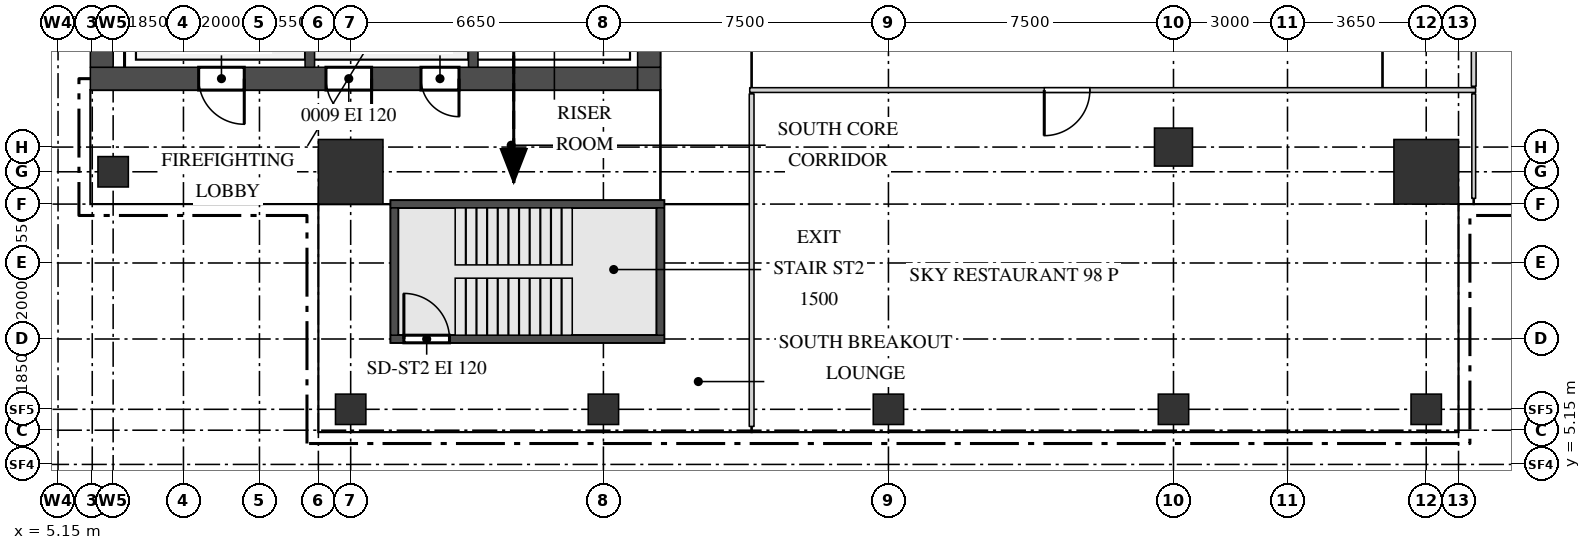
"""IFC4 building model, lengths in metres.
Left out: names, types, materials, properties, quantities, classifications, styles, units other than length and angle.
Written with IfcOpenShell. Run it as: python <this file> out.ifc"""

import sys

from ifc_helpers import new_model, si_unit, direction, frame, frame_2d, origin, origin_2d, place, context, subcontext, project, spatial, rectangle, extrude, source, transform, mapped, element, fill, save


model = new_model("IFC4")
c1 = context("Model", 3, precision=1e-05, world=origin(), true_north=direction((0.0, 1.0)))
c2 = subcontext(c1, "Body", "Model", "MODEL_VIEW")
j1 = project(units=[si_unit("LENGTHUNIT", "METRE"), si_unit("PLANEANGLEUNIT", "RADIAN")], contexts=[c1])
p1 = place(None, origin())
s1 = spatial("IfcSite", under=j1, at=p1, CompositionType="ELEMENT")
p2 = place(p1, origin())
s2 = spatial("IfcBuilding", under=s1, at=p2, CompositionType="ELEMENT")
p3 = place(p2, frame((0.0, 0.0, 306.2)))
s3 = spatial("IfcBuildingStorey", under=s2, at=p3, CompositionType="ELEMENT", Elevation=306.2)
m1 = source(origin(), c2, "Body", "SweptSolid", [
    extrude(rectangle(XDim=14.4, YDim=0.6, at=frame_2d((7.2, 0.0))), origin(), (0.0, 0.0, 1.0), 3.75),
])
p4 = place(p3, frame((6.0, 15.3, 0.0), z_axis=(0.0, 0.0, 1.0), x_axis=(1.0, 0.0, 0.0)))
e1 = element("IfcWall", 1, at=p4, inside=s3, PredefinedType="SHEAR", context=c2, shape_type="MappedRepresentation", body=[
    mapped(m1, transform((0.0, 0.0, 0.0))),
])
m2 = source(origin(), c2, "Body", "SweptSolid", [
    extrude(rectangle(XDim=1.2, YDim=2.1, at=frame_2d((0.6, 1.05))), frame((0.0, 0.31, 0.0), z_axis=(0.0, -1.0, 0.0), x_axis=(1.0, 0.0, 0.0)), (0.0, 0.0, 1.0), 0.62),
])
p5 = place(p4, frame((6.2, 0.0, 0.0)))
e2 = element("IfcOpeningElement", 2, at=p5, cuts=e1, PredefinedType="OPENING", context=c2, shape_type="MappedRepresentation", body=[
    mapped(m2, transform((0.0, 0.0, 0.0))),
])
p6 = place(p4, frame((2.85, 0.0, 0.0)))
e3 = element("IfcOpeningElement", 3, at=p6, cuts=e1, PredefinedType="OPENING", context=c2, shape_type="MappedRepresentation", body=[
    mapped(m2, transform((0.0, 0.0, 0.0))),
])
m3 = source(origin(), c2, "Body", "SweptSolid", [
    extrude(rectangle(XDim=1.0, YDim=2.1, at=frame_2d((0.5, 1.05))), frame((0.0, 0.31, 0.0), z_axis=(0.0, -1.0, 0.0), x_axis=(1.0, 0.0, 0.0)), (0.0, 0.0, 1.0), 0.62),
])
p7 = place(p4, frame((8.7, 0.0, 0.0)))
e4 = element("IfcOpeningElement", 4, at=p7, cuts=e1, PredefinedType="OPENING", context=c2, shape_type="MappedRepresentation", body=[
    mapped(m3, transform((0.0, 0.0, 0.0))),
])
m4 = source(origin(), c2, "Body", "SweptSolid", [
    extrude(rectangle(XDim=0.6, YDim=0.6, at=frame_2d((0.3, 0.0))), origin(), (0.0, 0.0, 1.0), 3.75),
])
p8 = place(p3, frame((20.4, 15.3, 0.0), z_axis=(0.0, 0.0, 1.0), x_axis=(1.0, 0.0, 0.0)))
e5 = element("IfcWall", 5, at=p8, inside=s3, PredefinedType="SHEAR", context=c2, shape_type="MappedRepresentation", body=[
    mapped(m4, transform((0.0, 0.0, 0.0))),
])
m5 = source(origin(), c2, "Body", "SweptSolid", [
    extrude(rectangle(XDim=22.8, YDim=0.6, at=frame_2d((11.4, 0.0))), origin(), (0.0, 0.0, 1.0), 3.75),
])
p9 = place(p3, frame((20.7, 15.6, 0.0), z_axis=(0.0, 0.0, 1.0), x_axis=(0.0, 1.0, 0.0)))
e6 = element("IfcWall", 6, at=p9, inside=s3, PredefinedType="SHEAR", context=c2, shape_type="MappedRepresentation", body=[
    mapped(m5, transform((0.0, 0.0, 0.0))),
])
m6 = source(origin(), c2, "Body", "SweptSolid", [
    extrude(rectangle(XDim=1.8, YDim=2.1, at=frame_2d((0.9, 1.05))), frame((0.0, 0.31, 0.0), z_axis=(0.0, -1.0, 0.0), x_axis=(1.0, 0.0, 0.0)), (0.0, 0.0, 1.0), 0.62),
])
p10 = place(p9, frame((10.9, 0.0, 0.0)))
e7 = element("IfcOpeningElement", 7, at=p10, cuts=e6, PredefinedType="OPENING", context=c2, shape_type="MappedRepresentation", body=[
    mapped(m6, transform((0.0, 0.0, 0.0))),
])
m7 = source(origin(), c2, "Body", "SweptSolid", [
    extrude(rectangle(XDim=0.9, YDim=2.1, at=frame_2d((0.45, 1.05))), frame((0.0, 0.31, 0.0), z_axis=(0.0, -1.0, 0.0), x_axis=(1.0, 0.0, 0.0)), (0.0, 0.0, 1.0), 0.62),
])
p11 = place(p9, frame((0.55, 0.0, 0.0)))
e8 = element("IfcOpeningElement", 8, at=p11, cuts=e6, PredefinedType="OPENING", context=c2, shape_type="MappedRepresentation", body=[
    mapped(m7, transform((0.0, 0.0, 0.0))),
])
p12 = place(p9, frame((3.0, 0.0, 0.0)))
e9 = element("IfcOpeningElement", 9, at=p12, cuts=e6, PredefinedType="OPENING", context=c2, shape_type="MappedRepresentation", body=[
    mapped(m7, transform((0.0, 0.0, 0.0))),
])
p13 = place(p9, frame((5.75, 0.0, 0.0)))
e10 = element("IfcOpeningElement", 10, at=p13, cuts=e6, PredefinedType="OPENING", context=c2, shape_type="MappedRepresentation", body=[
    mapped(m7, transform((0.0, 0.0, 0.0))),
])
p14 = place(p3, frame((6.3, 15.6, 0.0), z_axis=(0.0, 0.0, 1.0), x_axis=(0.0, 1.0, 0.0)))
e11 = element("IfcWall", 11, at=p14, inside=s3, PredefinedType="SHEAR", context=c2, shape_type="MappedRepresentation", body=[
    mapped(m5, transform((0.0, 0.0, 0.0))),
])
m8 = source(origin(), c2, "Body", "SweptSolid", [
    extrude(rectangle(XDim=7.2, YDim=0.2, at=frame_2d((3.6, 0.0))), origin(), (0.0, 0.0, 1.0), 3.75),
])
p15 = place(p3, frame((13.9, 12.0, 0.0), z_axis=(0.0, 0.0, 1.0), x_axis=(1.0, 0.0, 0.0)))
e12 = element("IfcWall", 12, at=p15, inside=s3, PredefinedType="SHEAR", context=c2, shape_type="MappedRepresentation", body=[
    mapped(m8, transform((0.0, 0.0, 0.0))),
])
p16 = place(p3, frame((13.9, 8.45, 0.0), z_axis=(0.0, 0.0, 1.0), x_axis=(1.0, 0.0, 0.0)))
e13 = element("IfcWall", 13, at=p16, inside=s3, PredefinedType="SHEAR", context=c2, shape_type="MappedRepresentation", body=[
    mapped(m8, transform((0.0, 0.0, 0.0))),
])
m9 = source(origin(), c2, "Body", "SweptSolid", [
    extrude(rectangle(XDim=1.2, YDim=2.1, at=frame_2d((0.6, 1.05))), frame((0.0, 0.11, 0.0), z_axis=(0.0, -1.0, 0.0), x_axis=(1.0, 0.0, 0.0)), (0.0, 0.0, 1.0), 0.22),
])
p17 = place(p16, frame((0.35, 0.0, 0.0)))
e14 = element("IfcOpeningElement", 14, at=p17, cuts=e13, PredefinedType="OPENING", context=c2, shape_type="MappedRepresentation", body=[
    mapped(m9, transform((0.0, 0.0, 0.0))),
])
m10 = source(origin(), c2, "Body", "SweptSolid", [
    extrude(rectangle(XDim=3.35, YDim=0.2, at=frame_2d((1.675, 0.0))), origin(), (0.0, 0.0, 1.0), 3.75),
])
for number, where, z_axis, x_axis in (
    (15, (21.0, 8.55, 0.0), (0.0, 0.0, 1.0), (0.0, 1.0, 0.0)),
    (16, (14.0, 8.55, 0.0), (0.0, 0.0, 1.0), (0.0, 1.0, 0.0)),
):
    element("IfcWall", number, at=place(p3, frame(where, z_axis=z_axis, x_axis=x_axis)), inside=s3, PredefinedType="SHEAR", context=c2, shape_type="MappedRepresentation", body=[
        mapped(m10, transform((0.0, 0.0, 0.0))),
    ])
m11 = source(origin(), c2, "Body", "SweptSolid", [
    extrude(rectangle(XDim=3.6, YDim=0.25, at=frame_2d((1.8, 0.0))), origin(), (0.0, 0.0, 1.0), 3.75),
])
for number, where, z_axis, x_axis in (
    (17, (16.075, 15.6, 0.0), (0.0, 0.0, 1.0), (0.0, 1.0, 0.0)),
    (18, (11.775, 15.6, 0.0), (0.0, 0.0, 1.0), (0.0, 1.0, 0.0)),
):
    element("IfcWall", number, at=place(p3, frame(where, z_axis=z_axis, x_axis=x_axis)), inside=s3, PredefinedType="STANDARD", context=c2, shape_type="MappedRepresentation", body=[
        mapped(m11, transform((0.0, 0.0, 0.0))),
    ])
m12 = source(origin(), c2, "Body", "SweptSolid", [
    extrude(rectangle(XDim=1.7, YDim=1.7, at=origin_2d()), origin(), (0.0, 0.0, 1.0), 3.75),
])
for number, where, z_axis, x_axis in (
    (19, (41.15, 12.85, 0.0), (0.0, 0.0, 1.0), (1.0, 0.0, 0.0)),
    (20, (12.85, 12.85, 0.0), (0.0, 0.0, 1.0), (1.0, 0.0, 0.0)),
):
    element("IfcColumn", number, at=place(p3, frame(where, z_axis=z_axis, x_axis=x_axis)), inside=s3, PredefinedType="COLUMN", context=c2, shape_type="MappedRepresentation", body=[
        mapped(m12, transform((0.0, 0.0, 0.0))),
    ])
m13 = source(origin(), c2, "Body", "SweptSolid", [
    extrude(rectangle(XDim=0.8, YDim=0.8, at=origin_2d()), origin(), (0.0, 0.0, 1.0), 3.75),
])
for number, where, z_axis, x_axis in (
    (21, (12.85, 6.6, 0.0), (0.0, 0.0, 1.0), (1.0, 0.0, 0.0)),
    (22, (19.5, 6.6, 0.0), (0.0, 0.0, 1.0), (1.0, 0.0, 0.0)),
    (23, (27.0, 6.6, 0.0), (0.0, 0.0, 1.0), (1.0, 0.0, 0.0)),
    (24, (34.5, 6.6, 0.0), (0.0, 0.0, 1.0), (1.0, 0.0, 0.0)),
    (25, (41.15, 6.6, 0.0), (0.0, 0.0, 1.0), (1.0, 0.0, 0.0)),
    (26, (6.6, 12.85, 0.0), (0.0, 0.0, 1.0), (1.0, 0.0, 0.0)),
):
    element("IfcColumn", number, at=place(p3, frame(where, z_axis=z_axis, x_axis=x_axis)), inside=s3, PredefinedType="COLUMN", context=c2, shape_type="MappedRepresentation", body=[
        mapped(m13, transform((0.0, 0.0, 0.0))),
    ])
m14 = source(origin(), c2, "Body", "SweptSolid", [
    extrude(rectangle(XDim=1.0, YDim=1.0, at=origin_2d()), origin(), (0.0, 0.0, 1.0), 3.75),
])
p18 = place(p3, frame((34.5, 13.5, 0.0), z_axis=(0.0, 0.0, 1.0), x_axis=(1.0, 0.0, 0.0)))
e27 = element("IfcColumn", 27, at=p18, inside=s3, PredefinedType="COLUMN", context=c2, shape_type="MappedRepresentation", body=[
    mapped(m14, transform((0.0, 0.0, 0.0))),
])
m15 = source(origin(), c2, "Body", "SweptSolid", [
    extrude(rectangle(XDim=8.75, YDim=0.125, at=frame_2d((4.375, 0.0))), origin(), (0.0, 0.0, 1.0), 3.8),
])
p19 = place(p3, frame((23.4, 6.15, 0.0), z_axis=(0.0, 0.0, 1.0), x_axis=(0.0, 1.0, 0.0)))
e28 = element("IfcWall", 28, at=p19, inside=s3, PredefinedType="PARTITIONING", context=c2, shape_type="MappedRepresentation", body=[
    mapped(m15, transform((0.0, 0.0, 0.0))),
])
m16 = source(origin(), c2, "Body", "SweptSolid", [
    extrude(rectangle(XDim=2.75, YDim=0.1, at=frame_2d((1.375, 0.0))), origin(), (0.0, 0.0, 1.0), 3.8),
])
p20 = place(p3, frame((42.4, 12.15, 0.0), z_axis=(0.0, 0.0, 1.0), x_axis=(0.0, 1.0, 0.0)))
e29 = element("IfcWall", 29, at=p20, inside=s3, PredefinedType="PARTITIONING", context=c2, shape_type="MappedRepresentation", body=[
    mapped(m16, transform((0.0, 0.0, 0.0))),
])
m17 = source(origin(), c2, "Body", "SweptSolid", [
    extrude(rectangle(XDim=19.1, YDim=0.125, at=frame_2d((9.55, 0.0))), origin(), (0.0, 0.0, 1.0), 3.8),
])
p21 = place(p3, frame((23.35, 15.0, 0.0), z_axis=(0.0, 0.0, 1.0), x_axis=(1.0, 0.0, 0.0)))
e30 = element("IfcWall", 30, at=p21, inside=s3, PredefinedType="PARTITIONING", context=c2, shape_type="MappedRepresentation", body=[
    mapped(m17, transform((0.0, 0.0, 0.0))),
])
m18 = source(origin(), c2, "Body", "SweptSolid", [
    extrude(rectangle(XDim=1.2, YDim=2.1, at=frame_2d((0.6, 1.05))), frame((0.0, 0.073, 0.0), z_axis=(0.0, -1.0, 0.0), x_axis=(1.0, 0.0, 0.0)), (0.0, 0.0, 1.0), 0.145),
])
p22 = place(p21, frame((7.75, 0.0, 0.0)))
e31 = element("IfcOpeningElement", 31, at=p22, cuts=e30, PredefinedType="OPENING", context=c2, shape_type="MappedRepresentation", body=[
    mapped(m18, transform((0.0, 0.0, 0.0))),
])
m19 = source(origin(), c2, "Body", "SweptSolid", [
    extrude(rectangle(XDim=23.8, YDim=0.125, at=frame_2d((11.9, 0.0))), origin(), (0.0, 0.0, 1.0), 3.8),
])
p23 = place(p3, frame((42.4, 15.1, 0.0), z_axis=(0.0, 0.0, 1.0), x_axis=(0.0, 1.0, 0.0)))
e32 = element("IfcWall", 32, at=p23, inside=s3, PredefinedType="PARTITIONING", context=c2, shape_type="MappedRepresentation", body=[
    mapped(m19, transform((0.0, 0.0, 0.0))),
])
p24 = place(p23, frame((1.55, 0.0, 0.0)))
e33 = element("IfcOpeningElement", 33, at=p24, cuts=e32, PredefinedType="OPENING", context=c2, shape_type="MappedRepresentation", body=[
    mapped(m18, transform((0.0, 0.0, 0.0))),
])
p25 = place(p23, frame((7.55, 0.0, 0.0)))
e34 = element("IfcOpeningElement", 34, at=p25, cuts=e32, PredefinedType="OPENING", context=c2, shape_type="MappedRepresentation", body=[
    mapped(m18, transform((0.0, 0.0, 0.0))),
])
m20 = source(origin(), c2, "Body", "SweptSolid", [
    extrude(rectangle(XDim=0.9, YDim=2.1, at=frame_2d((0.45, 1.05))), frame((0.0, 0.073, 0.0), z_axis=(0.0, -1.0, 0.0), x_axis=(1.0, 0.0, 0.0)), (0.0, 0.0, 1.0), 0.145),
])
p26 = place(p23, frame((13.3, 0.0, 0.0)))
e35 = element("IfcOpeningElement", 35, at=p26, cuts=e32, PredefinedType="OPENING", context=c2, shape_type="MappedRepresentation", body=[
    mapped(m20, transform((0.0, 0.0, 0.0))),
])
p27 = place(p23, frame((17.35, 0.0, 0.0)))
e36 = element("IfcOpeningElement", 36, at=p27, cuts=e32, PredefinedType="OPENING", context=c2, shape_type="MappedRepresentation", body=[
    mapped(m20, transform((0.0, 0.0, 0.0))),
])
m21 = source(origin(), c2, "Body", "SweptSolid", [
    extrude(rectangle(XDim=1.0, YDim=2.1, at=frame_2d((0.5, 1.05))), frame((0.0, 0.073, 0.0), z_axis=(0.0, -1.0, 0.0), x_axis=(1.0, 0.0, 0.0)), (0.0, 0.0, 1.0), 0.145),
])
p28 = place(p23, frame((21.15, 0.0, 0.0)))
e37 = element("IfcOpeningElement", 37, at=p28, cuts=e32, PredefinedType="OPENING", context=c2, shape_type="MappedRepresentation", body=[
    mapped(m21, transform((0.0, 0.0, 0.0))),
])
m22 = source(origin(), c2, "Body", "SweptSolid", [
    extrude(rectangle(XDim=1.2, YDim=2.1, at=frame_2d((0.6, 1.05))), frame((0.0, 0.25, 0.0), z_axis=(0.0, -1.0, 0.0), x_axis=(1.0, 0.0, 0.0)), (0.0, 0.0, 1.0), 0.5),
])
p29 = place(p5, origin())
e38 = element("IfcDoor", 38, at=p29, inside=s3, OperationType="SINGLE_SWING_RIGHT", PredefinedType="DOOR", context=c2, shape_type="MappedRepresentation", body=[
    mapped(m22, transform((0.0, 0.0, 0.0))),
])
fill(e2, e38)
p30 = place(p6, origin())
e39 = element("IfcDoor", 39, at=p30, inside=s3, OperationType="SINGLE_SWING_RIGHT", PredefinedType="DOOR", context=c2, shape_type="MappedRepresentation", body=[
    mapped(m22, transform((0.0, 0.0, 0.0))),
])
fill(e3, e39)
m23 = source(origin(), c2, "Body", "SweptSolid", [
    extrude(rectangle(XDim=1.0, YDim=2.1, at=frame_2d((0.5, 1.05))), frame((0.0, 0.25, 0.0), z_axis=(0.0, -1.0, 0.0), x_axis=(1.0, 0.0, 0.0)), (0.0, 0.0, 1.0), 0.5),
])
p31 = place(p7, origin())
e40 = element("IfcDoor", 40, at=p31, inside=s3, OperationType="SINGLE_SWING_RIGHT", PredefinedType="DOOR", context=c2, shape_type="MappedRepresentation", body=[
    mapped(m23, transform((0.0, 0.0, 0.0))),
])
fill(e4, e40)
m24 = source(origin(), c2, "Body", "SweptSolid", [
    extrude(rectangle(XDim=1.2, YDim=2.1, at=frame_2d((0.6, 1.05))), frame((0.0, 0.025, 0.0), z_axis=(0.0, -1.0, 0.0), x_axis=(1.0, 0.0, 0.0)), (0.0, 0.0, 1.0), 0.05),
])
p32 = place(p22, origin())
e41 = element("IfcDoor", 41, at=p32, inside=s3, OperationType="SINGLE_SWING_LEFT", PredefinedType="DOOR", context=c2, shape_type="MappedRepresentation", body=[
    mapped(m24, transform((0.0, 0.0, 0.0))),
])
fill(e31, e41)
p33 = place(p17, origin())
e42 = element("IfcDoor", 42, at=p33, inside=s3, OperationType="SINGLE_SWING_RIGHT", PredefinedType="DOOR", context=c2, shape_type="MappedRepresentation", body=[
    mapped(m24, transform((0.0, 0.0, 0.0))),
])
fill(e14, e42)
save(model, sys.argv[1])
